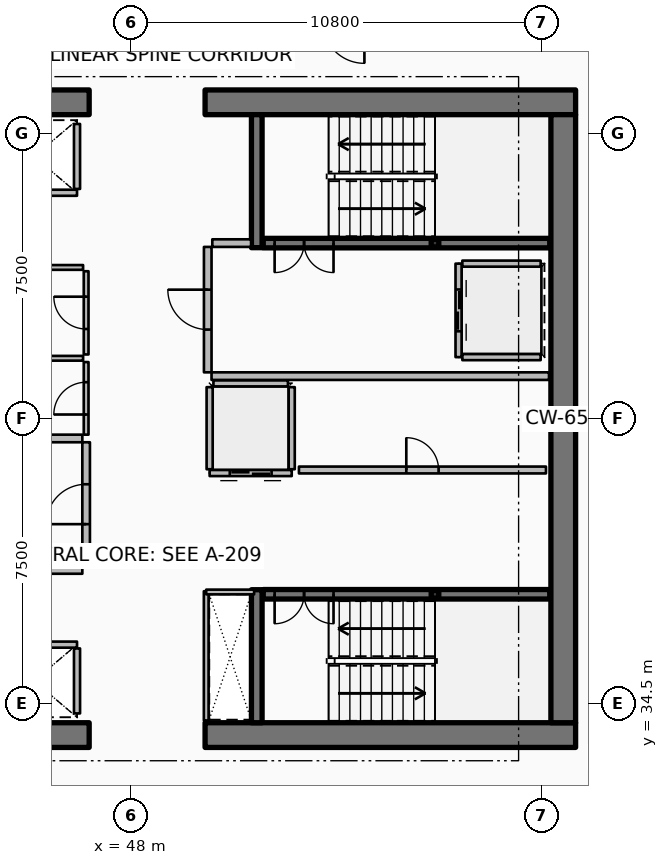
"""IFC4 building model, lengths in metres.
Left out: names, types, materials, properties, quantities, classifications, styles, units other than length and angle.
Written with IfcOpenShell. Run it as: python <this file> out.ifc"""

import sys

from ifc_helpers import new_model, si_unit, direction, frame, frame_2d, origin, origin_2d, place, context, subcontext, project, spatial, rectangle, hollow_rectangle, extrude, element, fill, save


model = new_model("IFC4")
c1 = context("Model", 3, precision=1e-05, world=origin(), true_north=direction((0.0, 1.0)))
c2 = subcontext(c1, "Body", "Model", "MODEL_VIEW")
j1 = project(units=[si_unit("LENGTHUNIT", "METRE"), si_unit("PLANEANGLEUNIT", "RADIAN")], contexts=[c1])
p1 = place(None, origin())
s1 = spatial("IfcSite", under=j1, at=p1, CompositionType="ELEMENT")
p2 = place(p1, origin())
s2 = spatial("IfcBuilding", under=s1, at=p2, CompositionType="ELEMENT")
p3 = place(p2, frame((0.0, 0.0, 191.55)))
s3 = spatial("IfcBuildingStorey", under=s2, at=p3, CompositionType="ELEMENT", Elevation=191.55)
for number, where, z_axis, x_axis in (
    (1, (37.15, 33.675, 0.0), (0.0, 0.0, 1.0), (1.0, 0.0, 0.0)),
    (2, (49.95, 33.675, 0.0), (0.0, 0.0, 1.0), (1.0, 0.0, 0.0)),
    (3, (37.15, 50.325, 0.0), (0.0, 0.0, 1.0), (1.0, 0.0, 0.0)),
    (4, (49.95, 50.325, 0.0), (0.0, 0.0, 1.0), (1.0, 0.0, 0.0)),
):
    element("IfcWall", number, at=place(p3, frame(where, z_axis=z_axis, x_axis=x_axis)), inside=s3, PredefinedType="SHEAR", context=c2, shape_type="SweptSolid", body=[
        extrude(rectangle(XDim=9.75, YDim=0.65, at=frame_2d((4.875, 0.0))), origin(), (0.0, 0.0, 1.0), 3.75),
    ])
p4 = place(p3, frame((59.375, 34.0, 0.0), z_axis=(0.0, 0.0, 1.0), x_axis=(0.0, 1.0, 0.0)))
e5 = element("IfcWall", 5, at=p4, inside=s3, PredefinedType="SHEAR", context=c2, shape_type="SweptSolid", body=[
    extrude(rectangle(XDim=16.0, YDim=0.65, at=frame_2d((8.0, 0.0))), origin(), (0.0, 0.0, 1.0), 3.75),
])
for number, where, z_axis, x_axis in (
    (6, (51.31, 46.5, 0.0), (0.0, 0.0, 1.0), (0.0, 1.0, 0.0)),
    (7, (51.31, 34.0, 0.0), (0.0, 0.0, 1.0), (0.0, 1.0, 0.0)),
):
    element("IfcWall", number, at=place(p3, frame(where, z_axis=z_axis, x_axis=x_axis)), inside=s3, PredefinedType="SHEAR", context=c2, shape_type="SweptSolid", body=[
        extrude(rectangle(XDim=3.5, YDim=0.28, at=frame_2d((1.75, 0.0))), origin(), (0.0, 0.0, 1.0), 3.75),
    ])
for number, where, z_axis, x_axis in (
    (8, (56.0, 46.62, 0.0), (0.0, 0.0, 1.0), (1.0, 0.0, 0.0)),
    (9, (56.0, 37.38, 0.0), (0.0, 0.0, 1.0), (1.0, 0.0, 0.0)),
):
    element("IfcColumn", number, at=place(p3, frame(where, z_axis=z_axis, x_axis=x_axis)), inside=s3, PredefinedType="COLUMN", context=c2, shape_type="SweptSolid", body=[
        extrude(hollow_rectangle(XDim=0.2, YDim=0.2, WallThickness=0.01, InnerFilletRadius=0.01, OuterFilletRadius=0.02, at=origin_2d()), origin(), (0.0, 0.0, 1.0), 1.67),
    ])
p5 = place(p3, frame((51.48, 46.62, 0.0), z_axis=(0.0, 0.0, 1.0), x_axis=(1.0, 0.0, 0.0)))
e10 = element("IfcWall", 10, at=p5, inside=s3, PredefinedType="SOLIDWALL", context=c2, shape_type="SweptSolid", body=[
    extrude(rectangle(XDim=7.54, YDim=0.25, at=frame_2d((3.77, 0.0))), origin(), (0.0, 0.0, 1.0), 3.5),
])
p6 = place(p5, frame((0.3, 0.0, 0.0)))
e11 = element("IfcOpeningElement", 11, at=p6, cuts=e10, PredefinedType="OPENING", context=c2, shape_type="SweptSolid", body=[
    extrude(rectangle(XDim=1.55, YDim=2.15, at=frame_2d((0.775, 1.075))), frame((0.0, 0.135, 0.0), z_axis=(0.0, -1.0, 0.0), x_axis=(1.0, 0.0, 0.0)), (0.0, 0.0, 1.0), 0.27),
])
p7 = place(p3, frame((51.48, 37.38, 0.0), z_axis=(0.0, 0.0, 1.0), x_axis=(1.0, 0.0, 0.0)))
e12 = element("IfcWall", 12, at=p7, inside=s3, PredefinedType="SOLIDWALL", context=c2, shape_type="SweptSolid", body=[
    extrude(rectangle(XDim=7.54, YDim=0.25, at=frame_2d((3.77, 0.0))), origin(), (0.0, 0.0, 1.0), 3.5),
])
p8 = place(p7, frame((0.3, 0.0, 0.0)))
e13 = element("IfcOpeningElement", 13, at=p8, cuts=e12, PredefinedType="OPENING", context=c2, shape_type="SweptSolid", body=[
    extrude(rectangle(XDim=1.55, YDim=2.15, at=frame_2d((0.775, 1.075))), frame((0.0, 0.135, 0.0), z_axis=(0.0, -1.0, 0.0), x_axis=(1.0, 0.0, 0.0)), (0.0, 0.0, 1.0), 0.27),
])
p9 = place(p3, frame((46.58, 47.945, 0.0), z_axis=(0.0, 0.0, 1.0), x_axis=(-1.0, 0.0, 0.0)))
e14 = element("IfcWall", 14, at=p9, inside=s3, PredefinedType="PARTITIONING", context=c2, shape_type="SweptSolid", body=[
    extrude(rectangle(XDim=2.26, YDim=0.16, at=frame_2d((1.13, 0.0))), origin(), (0.0, 0.0, 1.0), 3.5),
])
p10 = place(p3, frame((46.58, 48.045, 0.0), z_axis=(0.0, 0.0, 1.0), x_axis=(0.0, 1.0, 0.0)))
e15 = element("IfcWall", 15, at=p10, inside=s3, PredefinedType="PARTITIONING", context=c2, shape_type="SweptSolid", body=[
    extrude(rectangle(XDim=1.71, YDim=0.16, at=frame_2d((0.855, 0.0))), origin(), (0.0, 0.0, 1.0), 3.5),
])
p11 = place(p3, frame((44.32, 36.055, 0.0), z_axis=(0.0, 0.0, 1.0), x_axis=(1.0, 0.0, 0.0)))
e16 = element("IfcWall", 16, at=p11, inside=s3, PredefinedType="PARTITIONING", context=c2, shape_type="SweptSolid", body=[
    extrude(rectangle(XDim=2.26, YDim=0.16, at=frame_2d((1.13, 0.0))), origin(), (0.0, 0.0, 1.0), 3.5),
])
p12 = place(p3, frame((46.58, 34.245, 0.0), z_axis=(0.0, 0.0, 1.0), x_axis=(0.0, 1.0, 0.0)))
e17 = element("IfcWall", 17, at=p12, inside=s3, PredefinedType="PARTITIONING", context=c2, shape_type="SweptSolid", body=[
    extrude(rectangle(XDim=1.71, YDim=0.16, at=frame_2d((0.855, 0.0))), origin(), (0.0, 0.0, 1.0), 3.5),
])
p13 = place(p3, frame((56.62, 46.08, 0.0), z_axis=(0.0, 0.0, 1.0), x_axis=(0.0, -1.0, 0.0)))
e18 = element("IfcWall", 18, at=p13, inside=s3, PredefinedType="PARTITIONING", context=c2, shape_type="SweptSolid", body=[
    extrude(rectangle(XDim=2.46, YDim=0.16, at=frame_2d((1.23, 0.0))), origin(), (0.0, 0.0, 1.0), 3.5),
])
p14 = place(p13, frame((0.68, 0.0, 0.0)))
e19 = element("IfcOpeningElement", 19, at=p14, cuts=e18, PredefinedType="OPENING", context=c2, shape_type="SweptSolid", body=[
    extrude(rectangle(XDim=1.1, YDim=2.1, at=frame_2d((0.55, 1.05))), frame((0.0, 0.09, 0.0), z_axis=(0.0, -1.0, 0.0), x_axis=(1.0, 0.0, 0.0)), (0.0, 0.0, 1.0), 0.18),
])
for number, where, z_axis, x_axis in (
    (20, (56.72, 46.08, 0.0), (0.0, 0.0, 1.0), (1.0, 0.0, 0.0)),
    (21, (56.72, 43.62, 0.0), (0.0, 0.0, 1.0), (1.0, 0.0, 0.0)),
):
    element("IfcWall", number, at=place(p3, frame(where, z_axis=z_axis, x_axis=x_axis)), inside=s3, PredefinedType="PARTITIONING", context=c2, shape_type="SweptSolid", body=[
        extrude(rectangle(XDim=2.06, YDim=0.16, at=frame_2d((1.03, 0.0))), origin(), (0.0, 0.0, 1.0), 3.5),
    ])
p15 = place(p3, frame((52.23, 40.57, 0.0), z_axis=(0.0, 0.0, 1.0), x_axis=(-1.0, 0.0, 0.0)))
e22 = element("IfcWall", 22, at=p15, inside=s3, PredefinedType="PARTITIONING", context=c2, shape_type="SweptSolid", body=[
    extrude(rectangle(XDim=2.16, YDim=0.16, at=frame_2d((1.08, 0.0))), origin(), (0.0, 0.0, 1.0), 3.5),
])
p16 = place(p15, frame((0.53, 0.0, 0.0)))
e23 = element("IfcOpeningElement", 23, at=p16, cuts=e22, PredefinedType="OPENING", context=c2, shape_type="SweptSolid", body=[
    extrude(rectangle(XDim=1.1, YDim=2.1, at=frame_2d((0.55, 1.05))), frame((0.0, 0.09, 0.0), z_axis=(0.0, -1.0, 0.0), x_axis=(1.0, 0.0, 0.0)), (0.0, 0.0, 1.0), 0.18),
])
for number, where, z_axis, x_axis in (
    (24, (52.23, 40.67, 0.0), (0.0, 0.0, 1.0), (0.0, 1.0, 0.0)),
    (25, (50.07, 40.67, 0.0), (0.0, 0.0, 1.0), (0.0, 1.0, 0.0)),
):
    element("IfcWall", number, at=place(p3, frame(where, z_axis=z_axis, x_axis=x_axis)), inside=s3, PredefinedType="PARTITIONING", context=c2, shape_type="SweptSolid", body=[
        extrude(rectangle(XDim=2.16, YDim=0.16, at=frame_2d((1.08, 0.0))), origin(), (0.0, 0.0, 1.0), 3.5),
    ])
p17 = place(p3, frame((50.17, 42.93, 0.0), z_axis=(0.0, 0.0, 1.0), x_axis=(1.0, 0.0, 0.0)))
e26 = element("IfcWall", 26, at=p17, inside=s3, PredefinedType="PARTITIONING", context=c2, shape_type="SweptSolid", body=[
    extrude(rectangle(XDim=1.96, YDim=0.16, at=frame_2d((0.98, 0.0))), origin(), (0.0, 0.0, 1.0), 3.5),
])
p18 = place(p3, frame((52.42, 40.65, 0.0), z_axis=(0.0, 0.0, 1.0), x_axis=(1.0, 0.0, 0.0)))
e27 = element("IfcWall", 27, at=p18, inside=s3, PredefinedType="PARTITIONING", context=c2, shape_type="SweptSolid", body=[
    extrude(rectangle(XDim=6.5, YDim=0.18, at=frame_2d((3.25, 0.0))), origin(), (0.0, 0.0, 1.0), 3.5),
])
p19 = place(p18, frame((2.825, 0.0, 0.0)))
e28 = element("IfcOpeningElement", 28, at=p19, cuts=e27, PredefinedType="OPENING", context=c2, shape_type="SweptSolid", body=[
    extrude(rectangle(XDim=0.85, YDim=2.06, at=frame_2d((0.425, 1.03))), frame((0.0, 0.1, 0.0), z_axis=(0.0, -1.0, 0.0), x_axis=(1.0, 0.0, 0.0)), (0.0, 0.0, 1.0), 0.2),
])
p20 = place(p3, frame((41.35, 38.02, 0.0), z_axis=(0.0, 0.0, 1.0), x_axis=(1.0, 0.0, 0.0)))
e29 = element("IfcWall", 29, at=p20, inside=s3, PredefinedType="PARTITIONING", context=c2, shape_type="SweptSolid", body=[
    extrude(rectangle(XDim=5.37, YDim=0.2, at=frame_2d((2.685, 0.0))), origin(), (0.0, 0.0, 1.0), 3.5),
])
p21 = place(p3, frame((43.92, 41.48, 0.0), z_axis=(0.0, 0.0, 1.0), x_axis=(1.0, 0.0, 0.0)))
e30 = element("IfcWall", 30, at=p21, inside=s3, PredefinedType="PARTITIONING", context=c2, shape_type="SweptSolid", body=[
    extrude(rectangle(XDim=2.8, YDim=0.2, at=frame_2d((1.4, 0.0))), origin(), (0.0, 0.0, 1.0), 3.5),
])
p22 = place(p3, frame((46.82, 38.12, 0.0), z_axis=(0.0, 0.0, 1.0), x_axis=(0.0, 1.0, 0.0)))
e31 = element("IfcWall", 31, at=p22, inside=s3, PredefinedType="PARTITIONING", context=c2, shape_type="SweptSolid", body=[
    extrude(rectangle(XDim=3.26, YDim=0.2, at=frame_2d((1.63, 0.0))), origin(), (0.0, 0.0, 1.0), 3.5),
])
p23 = place(p22, frame((1.105, 0.0, 0.0)))
e32 = element("IfcOpeningElement", 32, at=p23, cuts=e31, PredefinedType="OPENING", context=c2, shape_type="SweptSolid", body=[
    extrude(rectangle(XDim=1.05, YDim=2.1, at=frame_2d((0.525, 1.05))), frame((0.0, 0.11, 0.0), z_axis=(0.0, -1.0, 0.0), x_axis=(1.0, 0.0, 0.0)), (0.0, 0.0, 1.0), 0.22),
])
p24 = place(p3, frame((50.12, 43.12, 0.0), z_axis=(0.0, 0.0, 1.0), x_axis=(1.0, 0.0, 0.0)))
e33 = element("IfcWall", 33, at=p24, inside=s3, PredefinedType="PARTITIONING", context=c2, shape_type="SweptSolid", body=[
    extrude(rectangle(XDim=8.88, YDim=0.2, at=frame_2d((4.44, 0.0))), origin(), (0.0, 0.0, 1.0), 3.5),
])
p25 = place(p3, frame((50.14, 46.62, 0.0), z_axis=(0.0, 0.0, 1.0), x_axis=(1.0, 0.0, 0.0)))
e34 = element("IfcWall", 34, at=p25, inside=s3, PredefinedType="PARTITIONING", context=c2, shape_type="SweptSolid", body=[
    extrude(rectangle(XDim=1.02, YDim=0.2, at=frame_2d((0.51, 0.0))), origin(), (0.0, 0.0, 1.0), 3.5),
])
p26 = place(p3, frame((50.02, 43.22, 0.0), z_axis=(0.0, 0.0, 1.0), x_axis=(0.0, 1.0, 0.0)))
e35 = element("IfcWall", 35, at=p26, inside=s3, PredefinedType="PARTITIONING", context=c2, shape_type="SweptSolid", body=[
    extrude(rectangle(XDim=3.3, YDim=0.2, at=frame_2d((1.65, 0.0))), origin(), (0.0, 0.0, 1.0), 3.5),
])
p27 = place(p26, frame((1.125, 0.0, 0.0)))
e36 = element("IfcOpeningElement", 36, at=p27, cuts=e35, PredefinedType="OPENING", context=c2, shape_type="SweptSolid", body=[
    extrude(rectangle(XDim=1.05, YDim=2.1, at=frame_2d((0.525, 1.05))), frame((0.0, 0.11, 0.0), z_axis=(0.0, -1.0, 0.0), x_axis=(1.0, 0.0, 0.0)), (0.0, 0.0, 1.0), 0.22),
])
p28 = place(p3, frame((49.98, 34.06, 0.0), z_axis=(0.0, 0.0, 1.0), x_axis=(0.0, 1.0, 0.0)))
e37 = element("IfcWall", 37, at=p28, inside=s3, PredefinedType="PARTITIONING", context=c2, shape_type="SweptSolid", body=[
    extrude(rectangle(XDim=3.4, YDim=0.125, at=frame_2d((1.7, 0.0))), origin(), (0.0, 0.0, 1.0), 2.94),
])
p29 = place(p3, frame((49.98, 37.44, 0.0), z_axis=(0.0, 0.0, 1.0), x_axis=(1.0, 0.0, 0.0)))
e38 = element("IfcWall", 38, at=p29, inside=s3, PredefinedType="PARTITIONING", context=c2, shape_type="SweptSolid", body=[
    extrude(rectangle(XDim=1.26, YDim=0.125, at=frame_2d((0.63, 0.0))), origin(), (0.0, 0.0, 1.0), 2.94),
])
p30 = place(p3, frame((44.03, 43.59, 0.0), z_axis=(0.0, 0.0, 1.0), x_axis=(1.0, 0.0, 0.0)))
e39 = element("IfcWall", 39, at=p30, inside=s3, PredefinedType="PARTITIONING", context=c2, shape_type="SweptSolid", body=[
    extrude(rectangle(XDim=2.71, YDim=0.125, at=frame_2d((1.355, 0.0))), origin(), (0.0, 0.0, 1.0), 2.94),
])
p31 = place(p3, frame((46.82, 41.58, 0.0), z_axis=(0.0, 0.0, 1.0), x_axis=(0.0, 1.0, 0.0)))
e40 = element("IfcWall", 40, at=p31, inside=s3, PredefinedType="PARTITIONING", context=c2, shape_type="SweptSolid", body=[
    extrude(rectangle(XDim=1.91, YDim=0.125, at=frame_2d((0.955, 0.0))), origin(), (0.0, 0.0, 1.0), 2.94),
])
p32 = place(p31, frame((0.53, 0.0, 0.0)))
e41 = element("IfcOpeningElement", 41, at=p32, cuts=e40, PredefinedType="OPENING", context=c2, shape_type="SweptSolid", body=[
    extrude(rectangle(XDim=0.85, YDim=2.06, at=frame_2d((0.425, 1.03))), frame((0.0, 0.073, 0.0), z_axis=(0.0, -1.0, 0.0), x_axis=(1.0, 0.0, 0.0)), (0.0, 0.0, 1.0), 0.145),
])
p33 = place(p3, frame((46.82, 43.69, 0.0), z_axis=(0.0, 0.0, 1.0), x_axis=(0.0, 1.0, 0.0)))
e42 = element("IfcWall", 42, at=p33, inside=s3, PredefinedType="PARTITIONING", context=c2, shape_type="SweptSolid", body=[
    extrude(rectangle(XDim=2.19, YDim=0.125, at=frame_2d((1.095, 0.0))), origin(), (0.0, 0.0, 1.0), 2.94),
])
p34 = place(p33, frame((0.67, 0.0, 0.0)))
e43 = element("IfcOpeningElement", 43, at=p34, cuts=e42, PredefinedType="OPENING", context=c2, shape_type="SweptSolid", body=[
    extrude(rectangle(XDim=0.85, YDim=2.06, at=frame_2d((0.425, 1.03))), frame((0.0, 0.073, 0.0), z_axis=(0.0, -1.0, 0.0), x_axis=(1.0, 0.0, 0.0)), (0.0, 0.0, 1.0), 0.145),
])
p35 = place(p3, frame((45.48, 45.98, 0.0), z_axis=(0.0, 0.0, 1.0), x_axis=(1.0, 0.0, 0.0)))
e44 = element("IfcWall", 44, at=p35, inside=s3, PredefinedType="PARTITIONING", context=c2, shape_type="SweptSolid", body=[
    extrude(rectangle(XDim=1.26, YDim=0.125, at=frame_2d((0.63, 0.0))), origin(), (0.0, 0.0, 1.0), 2.94),
])
p36 = place(p6, origin())
e45 = element("IfcDoor", 45, at=p36, inside=s3, OperationType="DOUBLE_DOOR_SINGLE_SWING", PredefinedType="DOOR", context=c2, shape_type="SweptSolid", body=[
    extrude(rectangle(XDim=1.55, YDim=2.15, at=frame_2d((0.775, 1.075))), frame((0.0, 0.025, 0.0), z_axis=(0.0, -1.0, 0.0), x_axis=(1.0, 0.0, 0.0)), (0.0, 0.0, 1.0), 0.05),
])
fill(e11, e45)
p37 = place(p8, origin())
e46 = element("IfcDoor", 46, at=p37, inside=s3, OperationType="DOUBLE_DOOR_SINGLE_SWING", PredefinedType="DOOR", context=c2, shape_type="SweptSolid", body=[
    extrude(rectangle(XDim=1.55, YDim=2.15, at=frame_2d((0.775, 1.075))), frame((0.0, 0.025, 0.0), z_axis=(0.0, -1.0, 0.0), x_axis=(1.0, 0.0, 0.0)), (0.0, 0.0, 1.0), 0.05),
])
fill(e13, e46)
p38 = place(p14, origin())
e47 = element("IfcDoor", 47, at=p38, inside=s3, OperationType="DOUBLE_DOOR_SLIDING", PredefinedType="DOOR", context=c2, shape_type="SweptSolid", body=[
    extrude(rectangle(XDim=1.1, YDim=2.1, at=frame_2d((0.55, 1.05))), frame((0.0, 0.025, 0.0), z_axis=(0.0, -1.0, 0.0), x_axis=(1.0, 0.0, 0.0)), (0.0, 0.0, 1.0), 0.05),
])
fill(e19, e47)
p39 = place(p16, origin())
e48 = element("IfcDoor", 48, at=p39, inside=s3, OperationType="DOUBLE_DOOR_SLIDING", PredefinedType="DOOR", context=c2, shape_type="SweptSolid", body=[
    extrude(rectangle(XDim=1.1, YDim=2.1, at=frame_2d((0.55, 1.05))), frame((0.0, 0.025, 0.0), z_axis=(0.0, -1.0, 0.0), x_axis=(1.0, 0.0, 0.0)), (0.0, 0.0, 1.0), 0.05),
])
fill(e23, e48)
p40 = place(p19, origin())
e49 = element("IfcDoor", 49, at=p40, inside=s3, OperationType="SINGLE_SWING_LEFT", PredefinedType="DOOR", context=c2, shape_type="SweptSolid", body=[
    extrude(rectangle(XDim=0.85, YDim=2.06, at=frame_2d((0.425, 1.03))), frame((0.0, 0.025, 0.0), z_axis=(0.0, -1.0, 0.0), x_axis=(1.0, 0.0, 0.0)), (0.0, 0.0, 1.0), 0.05),
])
fill(e28, e49)
p41 = place(p23, origin())
e50 = element("IfcDoor", 50, at=p41, inside=s3, OperationType="SINGLE_SWING_LEFT", PredefinedType="DOOR", context=c2, shape_type="SweptSolid", body=[
    extrude(rectangle(XDim=1.05, YDim=2.1, at=frame_2d((0.525, 1.05))), frame((0.0, 0.025, 0.0), z_axis=(0.0, -1.0, 0.0), x_axis=(1.0, 0.0, 0.0)), (0.0, 0.0, 1.0), 0.05),
])
fill(e32, e50)
p42 = place(p27, origin())
e51 = element("IfcDoor", 51, at=p42, inside=s3, OperationType="SINGLE_SWING_RIGHT", PredefinedType="DOOR", context=c2, shape_type="SweptSolid", body=[
    extrude(rectangle(XDim=1.05, YDim=2.1, at=frame_2d((0.525, 1.05))), frame((0.0, 0.025, 0.0), z_axis=(0.0, -1.0, 0.0), x_axis=(1.0, 0.0, 0.0)), (0.0, 0.0, 1.0), 0.05),
])
fill(e36, e51)
p43 = place(p32, origin())
e52 = element("IfcDoor", 52, at=p43, inside=s3, OperationType="SINGLE_SWING_LEFT", PredefinedType="DOOR", context=c2, shape_type="SweptSolid", body=[
    extrude(rectangle(XDim=0.85, YDim=2.06, at=frame_2d((0.425, 1.03))), frame((0.0, 0.025, 0.0), z_axis=(0.0, -1.0, 0.0), x_axis=(1.0, 0.0, 0.0)), (0.0, 0.0, 1.0), 0.05),
])
fill(e41, e52)
p44 = place(p34, origin())
e53 = element("IfcDoor", 53, at=p44, inside=s3, OperationType="SINGLE_SWING_RIGHT", PredefinedType="DOOR", context=c2, shape_type="SweptSolid", body=[
    extrude(rectangle(XDim=0.85, YDim=2.06, at=frame_2d((0.425, 1.03))), frame((0.0, 0.025, 0.0), z_axis=(0.0, -1.0, 0.0), x_axis=(1.0, 0.0, 0.0)), (0.0, 0.0, 1.0), 0.05),
])
fill(e43, e53)
save(model, sys.argv[1])
